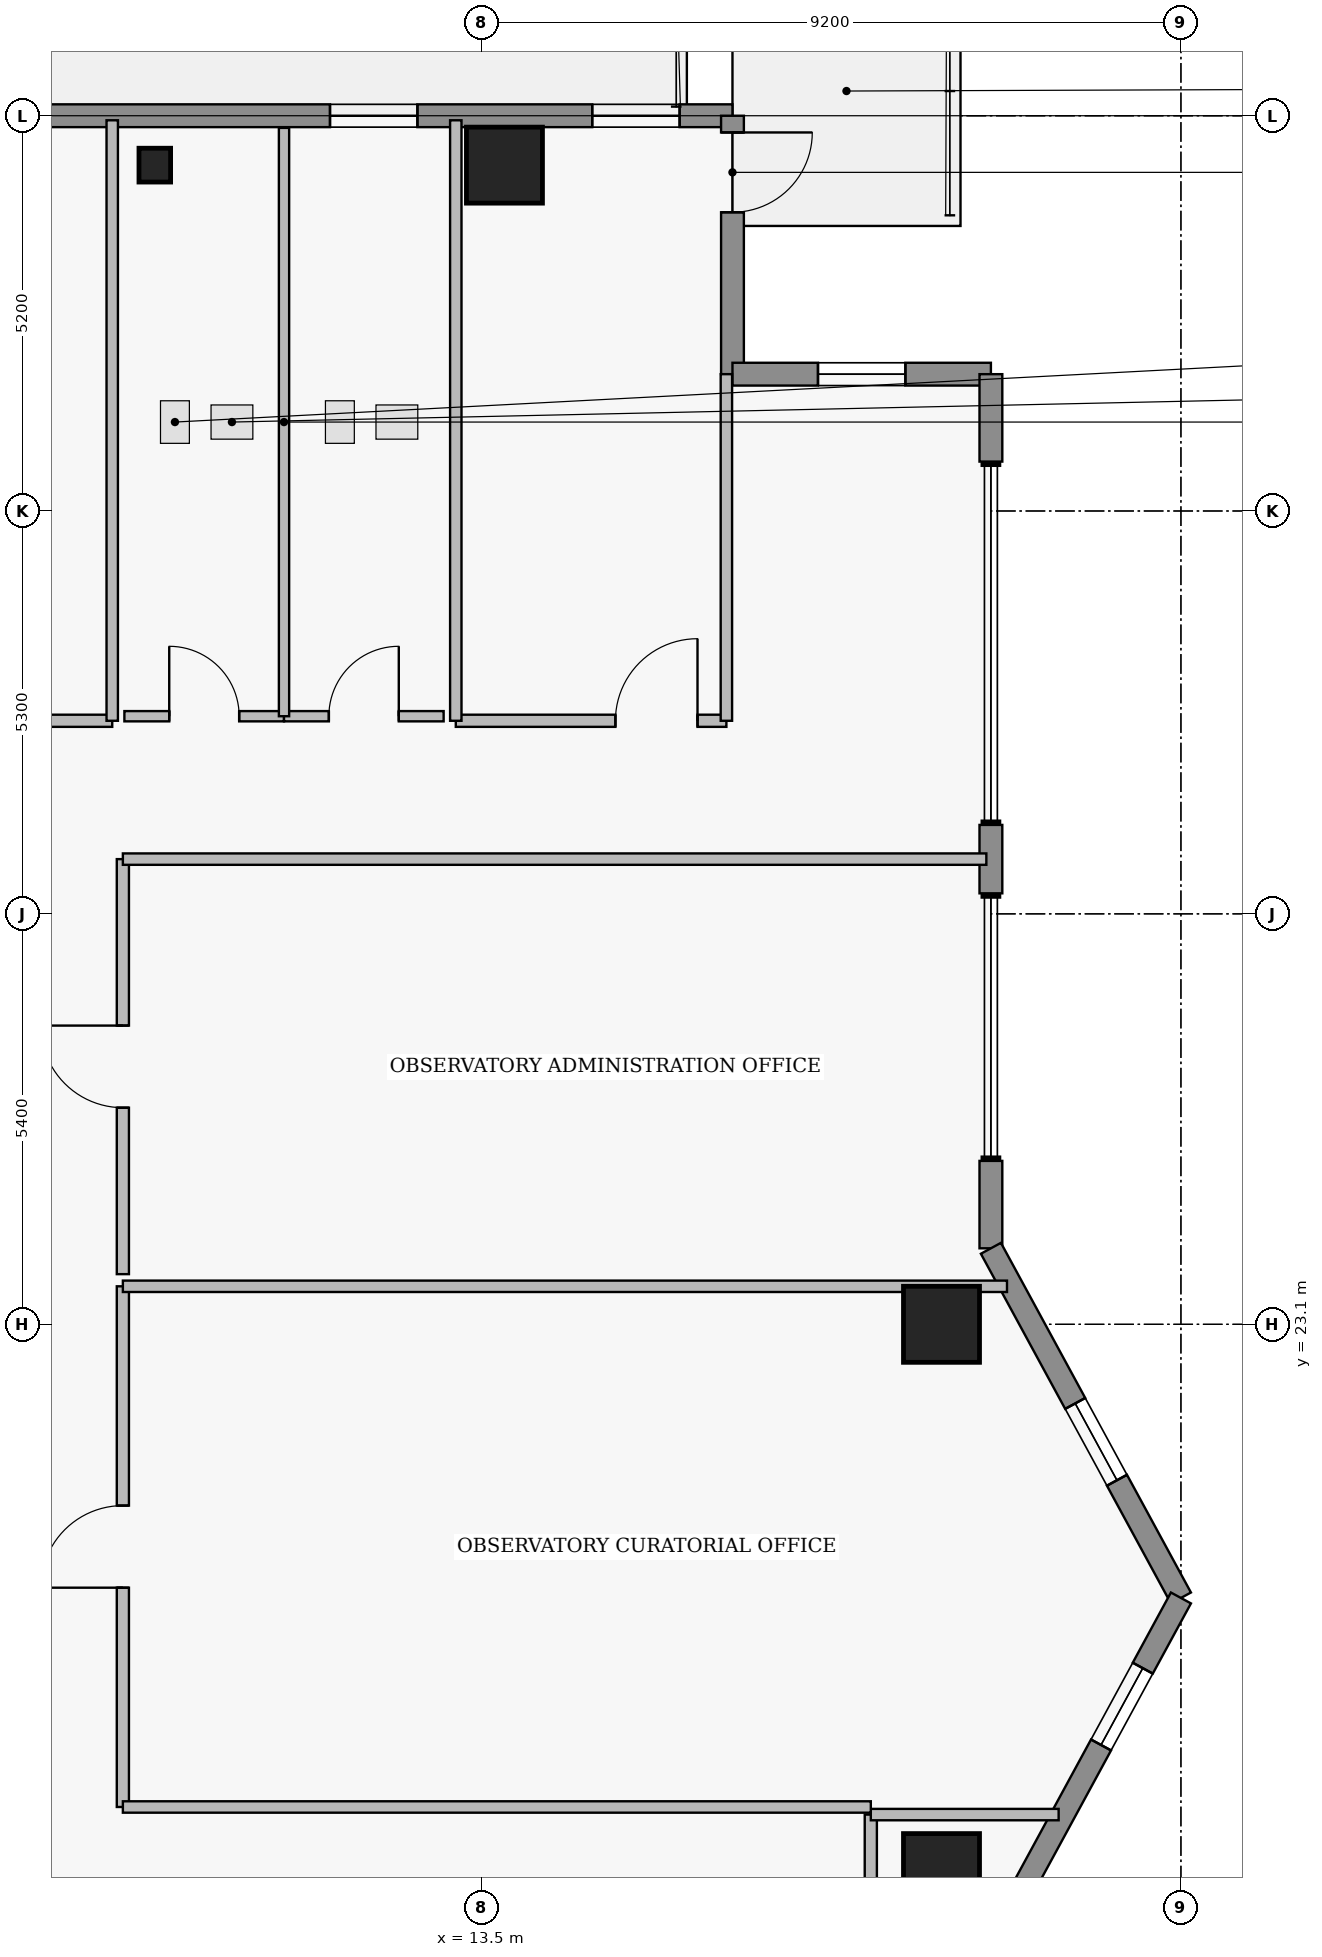
"""IFC4 building model, lengths in metres.
Left out: names, types, materials, properties, quantities, classifications, styles, units other than length and angle.
Written with IfcOpenShell. Run it as: python <this file> out.ifc"""

import sys

from ifc_helpers import new_model, si_unit, direction, frame, frame_2d, origin, origin_2d, place, context, subcontext, project, spatial, rectangle, i_section, extrude, element, fill, save


model = new_model("IFC4")
c1 = context("Model", 3, precision=1e-05, world=origin(), true_north=direction((0.0, 1.0)))
c2 = subcontext(c1, "Body", "Model", "MODEL_VIEW")
j1 = project(units=[si_unit("LENGTHUNIT", "METRE"), si_unit("PLANEANGLEUNIT", "RADIAN")], contexts=[c1])
p1 = place(None, origin())
s1 = spatial("IfcSite", under=j1, at=p1, CompositionType="ELEMENT")
p2 = place(p1, origin())
s2 = spatial("IfcBuilding", under=s1, at=p2, CompositionType="ELEMENT")
p3 = place(p2, frame((0.0, 0.0, 292.85)))
s3 = spatial("IfcBuildingStorey", under=s2, at=p3, CompositionType="ELEMENT", Elevation=292.85)
for number, where, z_axis, x_axis in (
    (1, (13.8, 38.35, 0.0), (0.0, 0.0, 1.0), (1.0, 0.0, 0.0)),
    (2, (19.55, 15.9, 0.0), (0.0, 0.0, 1.0), (1.0, 0.0, 0.0)),
    (3, (19.55, 23.1, 0.0), (0.0, 0.0, 1.0), (1.0, 0.0, 0.0)),
):
    element("IfcColumn", number, at=place(p3, frame(where, z_axis=z_axis, x_axis=x_axis)), inside=s3, PredefinedType="COLUMN", context=c2, shape_type="SweptSolid", body=[
        extrude(rectangle(XDim=1.0, YDim=1.0, at=origin_2d()), origin(), (0.0, 0.0, 1.0), 4.4),
    ])
p4 = place(p3, frame((9.2, 38.35, -0.22), z_axis=(0.0, 0.0, 1.0), x_axis=(1.0, 0.0, 0.0)))
e4 = element("IfcColumn", 4, at=p4, inside=s3, PredefinedType="PILASTER", context=c2, shape_type="SweptSolid", body=[
    extrude(i_section(OverallWidth=0.416, OverallDepth=0.445, WebThickness=0.039, FlangeThickness=0.063, at=origin_2d()), origin(), (0.0, 0.0, 1.0), 3.48),
])
p5 = place(p3, frame((3.43, 39.0, 0.0), z_axis=(0.0, 0.0, 1.0), x_axis=(1.0, 0.0, 0.0)))
e5 = element("IfcWall", 5, at=p5, inside=s3, PredefinedType="STANDARD", context=c2, shape_type="SweptSolid", body=[
    extrude(rectangle(XDim=13.37, YDim=0.3, at=frame_2d((6.685, 0.0))), origin(), (0.0, 0.0, 1.0), 4.16),
])
p6 = place(p5, frame((2.726, 0.0, 0.0)))
e6 = element("IfcOpeningElement", 6, at=p6, cuts=e5, PredefinedType="OPENING", context=c2, shape_type="SweptSolid", body=[
    extrude(rectangle(XDim=1.35, YDim=2.3, at=frame_2d((0.675, 1.15))), frame((0.0, 0.16, 0.0), z_axis=(0.0, -1.0, 0.0), x_axis=(1.0, 0.0, 0.0)), (0.0, 0.0, 1.0), 0.32),
])
p7 = place(p5, frame((8.075, 0.0, 0.95)))
e7 = element("IfcOpeningElement", 7, at=p7, cuts=e5, PredefinedType="OPENING", context=c2, shape_type="SweptSolid", body=[
    extrude(rectangle(XDim=1.15, YDim=1.55, at=frame_2d((0.575, 0.775))), frame((0.0, 0.16, 0.0), z_axis=(0.0, -1.0, 0.0), x_axis=(1.0, 0.0, 0.0)), (0.0, 0.0, 1.0), 0.32),
])
p8 = place(p5, frame((11.525, 0.0, 0.95)))
e8 = element("IfcOpeningElement", 8, at=p8, cuts=e5, PredefinedType="OPENING", context=c2, shape_type="SweptSolid", body=[
    extrude(rectangle(XDim=1.15, YDim=1.55, at=frame_2d((0.575, 0.775))), frame((0.0, 0.16, 0.0), z_axis=(0.0, -1.0, 0.0), x_axis=(1.0, 0.0, 0.0)), (0.0, 0.0, 1.0), 0.32),
])
p9 = place(p3, frame((16.8, 39.0, 0.0), z_axis=(0.0, 0.0, 1.0), x_axis=(0.0, -1.0, 0.0)))
e9 = element("IfcWall", 9, at=p9, inside=s3, PredefinedType="STANDARD", context=c2, shape_type="SweptSolid", body=[
    extrude(rectangle(XDim=3.4, YDim=0.3, at=frame_2d((1.7, 0.0))), origin(), (0.0, 0.0, 1.0), 4.16),
])
p10 = place(p9, frame((0.22, 0.0, 0.0)))
e10 = element("IfcOpeningElement", 10, at=p10, cuts=e9, PredefinedType="OPENING", context=c2, shape_type="SweptSolid", body=[
    extrude(rectangle(XDim=1.05, YDim=2.2, at=frame_2d((0.525, 1.1))), frame((0.0, 0.16, 0.0), z_axis=(0.0, -1.0, 0.0), x_axis=(1.0, 0.0, 0.0)), (0.0, 0.0, 1.0), 0.32),
])
p11 = place(p3, frame((16.8, 35.6, 0.0), z_axis=(0.0, 0.0, 1.0), x_axis=(1.0, 0.0, 0.0)))
e11 = element("IfcWall", 11, at=p11, inside=s3, PredefinedType="STANDARD", context=c2, shape_type="SweptSolid", body=[
    extrude(rectangle(XDim=3.4, YDim=0.3, at=frame_2d((1.7, 0.0))), origin(), (0.0, 0.0, 1.0), 4.16),
])
p12 = place(p11, frame((1.125, 0.0, 1.25)))
e12 = element("IfcOpeningElement", 12, at=p12, cuts=e11, PredefinedType="OPENING", context=c2, shape_type="SweptSolid", body=[
    extrude(rectangle(XDim=1.15, YDim=1.55, at=frame_2d((0.575, 0.775))), frame((0.0, 0.16, 0.0), z_axis=(0.0, -1.0, 0.0), x_axis=(1.0, 0.0, 0.0)), (0.0, 0.0, 1.0), 0.32),
])
p13 = place(p3, frame((20.2, 35.6, 0.0), z_axis=(0.0, 0.0, 1.0), x_axis=(0.0, -1.0, 0.0)))
e13 = element("IfcWall", 13, at=p13, inside=s3, PredefinedType="STANDARD", context=c2, shape_type="SweptSolid", body=[
    extrude(rectangle(XDim=1.15, YDim=0.3, at=frame_2d((0.575, 0.0))), origin(), (0.0, 0.0, 1.0), 4.16),
])
p14 = place(p3, frame((20.2, 29.67, 0.0), z_axis=(0.0, 0.0, 1.0), x_axis=(0.0, -1.0, 0.0)))
e14 = element("IfcWall", 14, at=p14, inside=s3, PredefinedType="STANDARD", context=c2, shape_type="SweptSolid", body=[
    extrude(rectangle(XDim=0.9, YDim=0.3, at=frame_2d((0.45, 0.0))), origin(), (0.0, 0.0, 1.0), 4.16),
])
p15 = place(p3, frame((20.2, 25.25, 0.0), z_axis=(0.0, 0.0, 1.0), x_axis=(0.0, -1.0, 0.0)))
e15 = element("IfcWall", 15, at=p15, inside=s3, PredefinedType="STANDARD", context=c2, shape_type="SweptSolid", body=[
    extrude(rectangle(XDim=1.15, YDim=0.3, at=frame_2d((0.575, 0.0))), origin(), (0.0, 0.0, 1.0), 4.16),
])
p16 = place(p3, frame((20.2, 24.1, 0.0), z_axis=(0.0, 0.0, 1.0), x_axis=(0.477505494629, -0.878628762675, 0.0)))
e16 = element("IfcWall", 16, at=p16, inside=s3, PredefinedType="STANDARD", context=c2, shape_type="SweptSolid", body=[
    extrude(rectangle(XDim=5.236, YDim=0.3, at=frame_2d((2.618, 0.0))), origin(), (0.0, 0.0, 1.0), 4.16),
])
p17 = place(p16, frame((2.323, 0.0, 1.25)))
e17 = element("IfcOpeningElement", 17, at=p17, cuts=e16, PredefinedType="OPENING", context=c2, shape_type="SweptSolid", body=[
    extrude(rectangle(XDim=1.15, YDim=1.55, at=frame_2d((0.575, 0.775))), frame((0.0, 0.16, 0.0), z_axis=(0.0, -1.0, 0.0), x_axis=(1.0, 0.0, 0.0)), (0.0, 0.0, 1.0), 0.32),
])
p18 = place(p3, frame((22.7, 19.5, 0.0), z_axis=(0.0, 0.0, 1.0), x_axis=(-0.477505494629, -0.878628762675, 0.0)))
e18 = element("IfcWall", 18, at=p18, inside=s3, PredefinedType="STANDARD", context=c2, shape_type="SweptSolid", body=[
    extrude(rectangle(XDim=5.236, YDim=0.3, at=frame_2d((2.618, 0.0))), origin(), (0.0, 0.0, 1.0), 4.16),
])
p19 = place(p18, frame((1.051, 0.0, 1.25)))
e19 = element("IfcOpeningElement", 19, at=p19, cuts=e18, PredefinedType="OPENING", context=c2, shape_type="SweptSolid", body=[
    extrude(rectangle(XDim=1.15, YDim=1.55, at=frame_2d((0.575, 0.775))), frame((0.0, 0.16, 0.0), z_axis=(0.0, -1.0, 0.0), x_axis=(1.0, 0.0, 0.0)), (0.0, 0.0, 1.0), 0.32),
])
p20 = place(p3, frame((18.62, 4.48, 0.0), z_axis=(0.0, 0.0, 1.0), x_axis=(0.0, 1.0, 0.0)))
e20 = element("IfcWall", 20, at=p20, inside=s3, PredefinedType="PARTITIONING", context=c2, shape_type="SweptSolid", body=[
    extrude(rectangle(XDim=12.17, YDim=0.16, at=frame_2d((6.085, 0.0))), origin(), (0.0, 0.0, 1.0), 4.16),
])
p21 = place(p20, frame((5.625, 0.0, 0.0)))
e21 = element("IfcOpeningElement", 21, at=p21, cuts=e20, PredefinedType="OPENING", context=c2, shape_type="SweptSolid", body=[
    extrude(rectangle(XDim=0.92, YDim=2.12, at=frame_2d((0.46, 1.06))), frame((0.0, 0.09, 0.0), z_axis=(0.0, -1.0, 0.0), x_axis=(1.0, 0.0, 0.0)), (0.0, 0.0, 1.0), 0.18),
])
p22 = place(p3, frame((4.04, 31.04, 0.0), z_axis=(0.0, 0.0, 1.0), x_axis=(1.0, 0.0, 0.0)))
e22 = element("IfcWall", 22, at=p22, inside=s3, PredefinedType="PARTITIONING", context=c2, shape_type="SweptSolid", body=[
    extrude(rectangle(XDim=4.6, YDim=0.16, at=frame_2d((2.3, 0.0))), origin(), (0.0, 0.0, 1.0), 4.16),
])
p23 = place(p22, frame((2.27, 0.0, 0.0)))
e23 = element("IfcOpeningElement", 23, at=p23, cuts=e22, PredefinedType="OPENING", context=c2, shape_type="SweptSolid", body=[
    extrude(rectangle(XDim=1.08, YDim=2.18, at=frame_2d((0.54, 1.09))), frame((0.0, 0.09, 0.0), z_axis=(0.0, -1.0, 0.0), x_axis=(1.0, 0.0, 0.0)), (0.0, 0.0, 1.0), 0.18),
])
p24 = place(p3, frame((13.16, 31.04, 0.0), z_axis=(0.0, 0.0, 1.0), x_axis=(1.0, 0.0, 0.0)))
e24 = element("IfcWall", 24, at=p24, inside=s3, PredefinedType="PARTITIONING", context=c2, shape_type="SweptSolid", body=[
    extrude(rectangle(XDim=3.56, YDim=0.16, at=frame_2d((1.78, 0.0))), origin(), (0.0, 0.0, 1.0), 4.16),
])
p25 = place(p24, frame((2.1, 0.0, 0.0)))
e25 = element("IfcOpeningElement", 25, at=p25, cuts=e24, PredefinedType="OPENING", context=c2, shape_type="SweptSolid", body=[
    extrude(rectangle(XDim=1.08, YDim=2.18, at=frame_2d((0.54, 1.09))), frame((0.0, 0.09, 0.0), z_axis=(0.0, -1.0, 0.0), x_axis=(1.0, 0.0, 0.0)), (0.0, 0.0, 1.0), 0.18),
])
p26 = place(p3, frame((8.78, 16.75, 0.0), z_axis=(0.0, 0.0, 1.0), x_axis=(0.0, 1.0, 0.0)))
e26 = element("IfcWall", 26, at=p26, inside=s3, PredefinedType="PARTITIONING", context=c2, shape_type="SweptSolid", body=[
    extrude(rectangle(XDim=6.85, YDim=0.16, at=frame_2d((3.425, 0.0))), origin(), (0.0, 0.0, 1.0), 4.16),
])
p27 = place(p26, frame((2.885, 0.0, 0.0)))
e27 = element("IfcOpeningElement", 27, at=p27, cuts=e26, PredefinedType="OPENING", context=c2, shape_type="SweptSolid", body=[
    extrude(rectangle(XDim=1.08, YDim=2.18, at=frame_2d((0.54, 1.09))), frame((0.0, 0.09, 0.0), z_axis=(0.0, -1.0, 0.0), x_axis=(1.0, 0.0, 0.0)), (0.0, 0.0, 1.0), 0.18),
])
p28 = place(p3, frame((8.78, 23.76, 0.0), z_axis=(0.0, 0.0, 1.0), x_axis=(0.0, 1.0, 0.0)))
e28 = element("IfcWall", 28, at=p28, inside=s3, PredefinedType="PARTITIONING", context=c2, shape_type="SweptSolid", body=[
    extrude(rectangle(XDim=5.46, YDim=0.16, at=frame_2d((2.73, 0.0))), origin(), (0.0, 0.0, 1.0), 4.16),
])
p29 = place(p28, frame((2.19, 0.0, 0.0)))
e29 = element("IfcOpeningElement", 29, at=p29, cuts=e28, PredefinedType="OPENING", context=c2, shape_type="SweptSolid", body=[
    extrude(rectangle(XDim=1.08, YDim=2.18, at=frame_2d((0.54, 1.09))), frame((0.0, 0.09, 0.0), z_axis=(0.0, -1.0, 0.0), x_axis=(1.0, 0.0, 0.0)), (0.0, 0.0, 1.0), 0.18),
])
p30 = place(p3, frame((8.8, 31.1, 0.0), z_axis=(0.0, 0.0, 1.0), x_axis=(1.0, 0.0, 0.0)))
e30 = element("IfcWall", 30, at=p30, inside=s3, PredefinedType="PLUMBINGWALL", context=c2, shape_type="SweptSolid", body=[
    extrude(rectangle(XDim=2.1, YDim=0.135, at=frame_2d((1.05, 0.0))), origin(), (0.0, 0.0, 1.0), 4.16),
])
p31 = place(p30, frame((0.59, 0.0, 0.0)))
e31 = element("IfcOpeningElement", 31, at=p31, cuts=e30, PredefinedType="OPENING", context=c2, shape_type="SweptSolid", body=[
    extrude(rectangle(XDim=0.92, YDim=2.12, at=frame_2d((0.46, 1.06))), frame((0.0, 0.077, 0.0), z_axis=(0.0, -1.0, 0.0), x_axis=(1.0, 0.0, 0.0)), (0.0, 0.0, 1.0), 0.155),
])
p32 = place(p3, frame((10.9, 31.1, 0.0), z_axis=(0.0, 0.0, 1.0), x_axis=(1.0, 0.0, 0.0)))
e32 = element("IfcWall", 32, at=p32, inside=s3, PredefinedType="PLUMBINGWALL", context=c2, shape_type="SweptSolid", body=[
    extrude(rectangle(XDim=2.1, YDim=0.135, at=frame_2d((1.05, 0.0))), origin(), (0.0, 0.0, 1.0), 4.16),
])
p33 = place(p32, frame((0.59, 0.0, 0.0)))
e33 = element("IfcOpeningElement", 33, at=p33, cuts=e32, PredefinedType="OPENING", context=c2, shape_type="SweptSolid", body=[
    extrude(rectangle(XDim=0.92, YDim=2.12, at=frame_2d((0.46, 1.06))), frame((0.0, 0.077, 0.0), z_axis=(0.0, -1.0, 0.0), x_axis=(1.0, 0.0, 0.0)), (0.0, 0.0, 1.0), 0.155),
])
p34 = place(p3, frame((18.62, 16.65, 0.0), z_axis=(0.0, 0.0, 1.0), x_axis=(1.0, 0.0, 0.0)))
e34 = element("IfcWall", 34, at=p34, inside=s3, PredefinedType="PARTITIONING", context=c2, shape_type="SweptSolid", body=[
    extrude(rectangle(XDim=2.471, YDim=0.15, at=frame_2d((1.235, 0.0))), origin(), (0.0, 0.0, 1.0), 4.16),
])
for number, where, z_axis, x_axis in (
    (35, (8.64, 31.04, 0.0), (0.0, 0.0, 1.0), (0.0, 1.0, 0.0)),
    (36, (13.16, 31.04, 0.0), (0.0, 0.0, 1.0), (0.0, 1.0, 0.0)),
):
    element("IfcWall", number, at=place(p3, frame(where, z_axis=z_axis, x_axis=x_axis)), inside=s3, PredefinedType="PARTITIONING", context=c2, shape_type="SweptSolid", body=[
        extrude(rectangle(XDim=7.9, YDim=0.15, at=frame_2d((3.95, 0.0))), origin(), (0.0, 0.0, 1.0), 4.16),
    ])
p35 = place(p3, frame((16.72, 31.04, 0.0), z_axis=(0.0, 0.0, 1.0), x_axis=(0.0, 1.0, 0.0)))
e37 = element("IfcWall", 37, at=p35, inside=s3, PredefinedType="PARTITIONING", context=c2, shape_type="SweptSolid", body=[
    extrude(rectangle(XDim=4.56, YDim=0.15, at=frame_2d((2.28, 0.0))), origin(), (0.0, 0.0, 1.0), 4.16),
])
p36 = place(p3, frame((8.78, 16.75, 0.0), z_axis=(0.0, 0.0, 1.0), x_axis=(1.0, 0.0, 0.0)))
e38 = element("IfcWall", 38, at=p36, inside=s3, PredefinedType="PARTITIONING", context=c2, shape_type="SweptSolid", body=[
    extrude(rectangle(XDim=9.84, YDim=0.15, at=frame_2d((4.92, 0.0))), origin(), (0.0, 0.0, 1.0), 4.16),
])
p37 = place(p3, frame((8.78, 23.6, 0.0), z_axis=(0.0, 0.0, 1.0), x_axis=(1.0, 0.0, 0.0)))
e39 = element("IfcWall", 39, at=p37, inside=s3, PredefinedType="PARTITIONING", context=c2, shape_type="SweptSolid", body=[
    extrude(rectangle(XDim=11.632, YDim=0.15, at=frame_2d((5.816, 0.0))), origin(), (0.0, 0.0, 1.0), 4.16),
])
p38 = place(p3, frame((8.78, 29.22, 0.0), z_axis=(0.0, 0.0, 1.0), x_axis=(1.0, 0.0, 0.0)))
e40 = element("IfcWall", 40, at=p38, inside=s3, PredefinedType="PARTITIONING", context=c2, shape_type="SweptSolid", body=[
    extrude(rectangle(XDim=11.36, YDim=0.15, at=frame_2d((5.68, 0.0))), origin(), (0.0, 0.0, 1.0), 4.16),
])
p39 = place(p3, frame((10.9, 31.1, 0.0), z_axis=(0.0, 0.0, 1.0), x_axis=(0.0, 1.0, 0.0)))
e41 = element("IfcWall", 41, at=p39, inside=s3, PredefinedType="PLUMBINGWALL", context=c2, shape_type="SweptSolid", body=[
    extrude(rectangle(XDim=7.74, YDim=0.135, at=frame_2d((3.87, 0.0))), origin(), (0.0, 0.0, 1.0), 4.16),
])
p40 = place(p7, origin())
e42 = element("IfcWindow", 42, at=p40, inside=s3, PartitioningType="SINGLE_PANEL", PredefinedType="WINDOW", context=c2, shape_type="SweptSolid", body=[
    extrude(rectangle(XDim=1.15, YDim=1.55, at=frame_2d((0.575, 0.775))), frame((0.0, 0.03, 0.0), z_axis=(0.0, -1.0, 0.0), x_axis=(1.0, 0.0, 0.0)), (0.0, 0.0, 1.0), 0.06),
])
fill(e7, e42)
p41 = place(p8, origin())
e43 = element("IfcWindow", 43, at=p41, inside=s3, PartitioningType="SINGLE_PANEL", PredefinedType="WINDOW", context=c2, shape_type="SweptSolid", body=[
    extrude(rectangle(XDim=1.15, YDim=1.55, at=frame_2d((0.575, 0.775))), frame((0.0, 0.03, 0.0), z_axis=(0.0, -1.0, 0.0), x_axis=(1.0, 0.0, 0.0)), (0.0, 0.0, 1.0), 0.06),
])
fill(e8, e43)
p42 = place(p10, origin())
e44 = element("IfcDoor", 44, at=p42, inside=s3, OperationType="SINGLE_SWING_LEFT", PredefinedType="DOOR", context=c2, shape_type="SweptSolid", body=[
    extrude(rectangle(XDim=1.05, YDim=2.2, at=frame_2d((0.525, 1.1))), frame((0.0, 0.025, 0.0), z_axis=(0.0, -1.0, 0.0), x_axis=(1.0, 0.0, 0.0)), (0.0, 0.0, 1.0), 0.05),
])
fill(e10, e44)
p43 = place(p12, origin())
e45 = element("IfcWindow", 45, at=p43, inside=s3, PartitioningType="SINGLE_PANEL", PredefinedType="WINDOW", context=c2, shape_type="SweptSolid", body=[
    extrude(rectangle(XDim=1.15, YDim=1.55, at=frame_2d((0.575, 0.775))), frame((0.0, 0.03, 0.0), z_axis=(0.0, -1.0, 0.0), x_axis=(1.0, 0.0, 0.0)), (0.0, 0.0, 1.0), 0.06),
])
fill(e12, e45)
p44 = place(p17, origin())
e46 = element("IfcWindow", 46, at=p44, inside=s3, PartitioningType="SINGLE_PANEL", PredefinedType="WINDOW", context=c2, shape_type="SweptSolid", body=[
    extrude(rectangle(XDim=1.15, YDim=1.55, at=frame_2d((0.575, 0.775))), frame((0.0, 0.03, 0.0), z_axis=(0.0, -1.0, 0.0), x_axis=(1.0, 0.0, 0.0)), (0.0, 0.0, 1.0), 0.06),
])
fill(e17, e46)
p45 = place(p19, origin())
e47 = element("IfcWindow", 47, at=p45, inside=s3, PartitioningType="SINGLE_PANEL", PredefinedType="WINDOW", context=c2, shape_type="SweptSolid", body=[
    extrude(rectangle(XDim=1.15, YDim=1.55, at=frame_2d((0.575, 0.775))), frame((0.0, 0.03, 0.0), z_axis=(0.0, -1.0, 0.0), x_axis=(1.0, 0.0, 0.0)), (0.0, 0.0, 1.0), 0.06),
])
fill(e19, e47)
p46 = place(p25, origin())
e48 = element("IfcDoor", 48, at=p46, inside=s3, OperationType="SINGLE_SWING_RIGHT", PredefinedType="DOOR", context=c2, shape_type="SweptSolid", body=[
    extrude(rectangle(XDim=1.08, YDim=2.18, at=frame_2d((0.54, 1.09))), frame((0.0, 0.025, 0.0), z_axis=(0.0, -1.0, 0.0), x_axis=(1.0, 0.0, 0.0)), (0.0, 0.0, 1.0), 0.05),
])
fill(e25, e48)
p47 = place(p27, origin())
e49 = element("IfcDoor", 49, at=p47, inside=s3, OperationType="SINGLE_SWING_LEFT", PredefinedType="DOOR", context=c2, shape_type="SweptSolid", body=[
    extrude(rectangle(XDim=1.08, YDim=2.18, at=frame_2d((0.54, 1.09))), frame((0.0, 0.025, 0.0), z_axis=(0.0, -1.0, 0.0), x_axis=(1.0, 0.0, 0.0)), (0.0, 0.0, 1.0), 0.05),
])
fill(e27, e49)
p48 = place(p29, origin())
e50 = element("IfcDoor", 50, at=p48, inside=s3, OperationType="SINGLE_SWING_RIGHT", PredefinedType="DOOR", context=c2, shape_type="SweptSolid", body=[
    extrude(rectangle(XDim=1.08, YDim=2.18, at=frame_2d((0.54, 1.09))), frame((0.0, 0.025, 0.0), z_axis=(0.0, -1.0, 0.0), x_axis=(1.0, 0.0, 0.0)), (0.0, 0.0, 1.0), 0.05),
])
fill(e29, e50)
p49 = place(p31, origin())
e51 = element("IfcDoor", 51, at=p49, inside=s3, OperationType="SINGLE_SWING_LEFT", PredefinedType="DOOR", context=c2, shape_type="SweptSolid", body=[
    extrude(rectangle(XDim=0.92, YDim=2.12, at=frame_2d((0.46, 1.06))), frame((0.0, 0.025, 0.0), z_axis=(0.0, -1.0, 0.0), x_axis=(1.0, 0.0, 0.0)), (0.0, 0.0, 1.0), 0.05),
])
fill(e31, e51)
p50 = place(p33, origin())
e52 = element("IfcDoor", 52, at=p50, inside=s3, OperationType="SINGLE_SWING_RIGHT", PredefinedType="DOOR", context=c2, shape_type="SweptSolid", body=[
    extrude(rectangle(XDim=0.92, YDim=2.12, at=frame_2d((0.46, 1.06))), frame((0.0, 0.025, 0.0), z_axis=(0.0, -1.0, 0.0), x_axis=(1.0, 0.0, 0.0)), (0.0, 0.0, 1.0), 0.05),
])
fill(e33, e52)
save(model, sys.argv[1])
